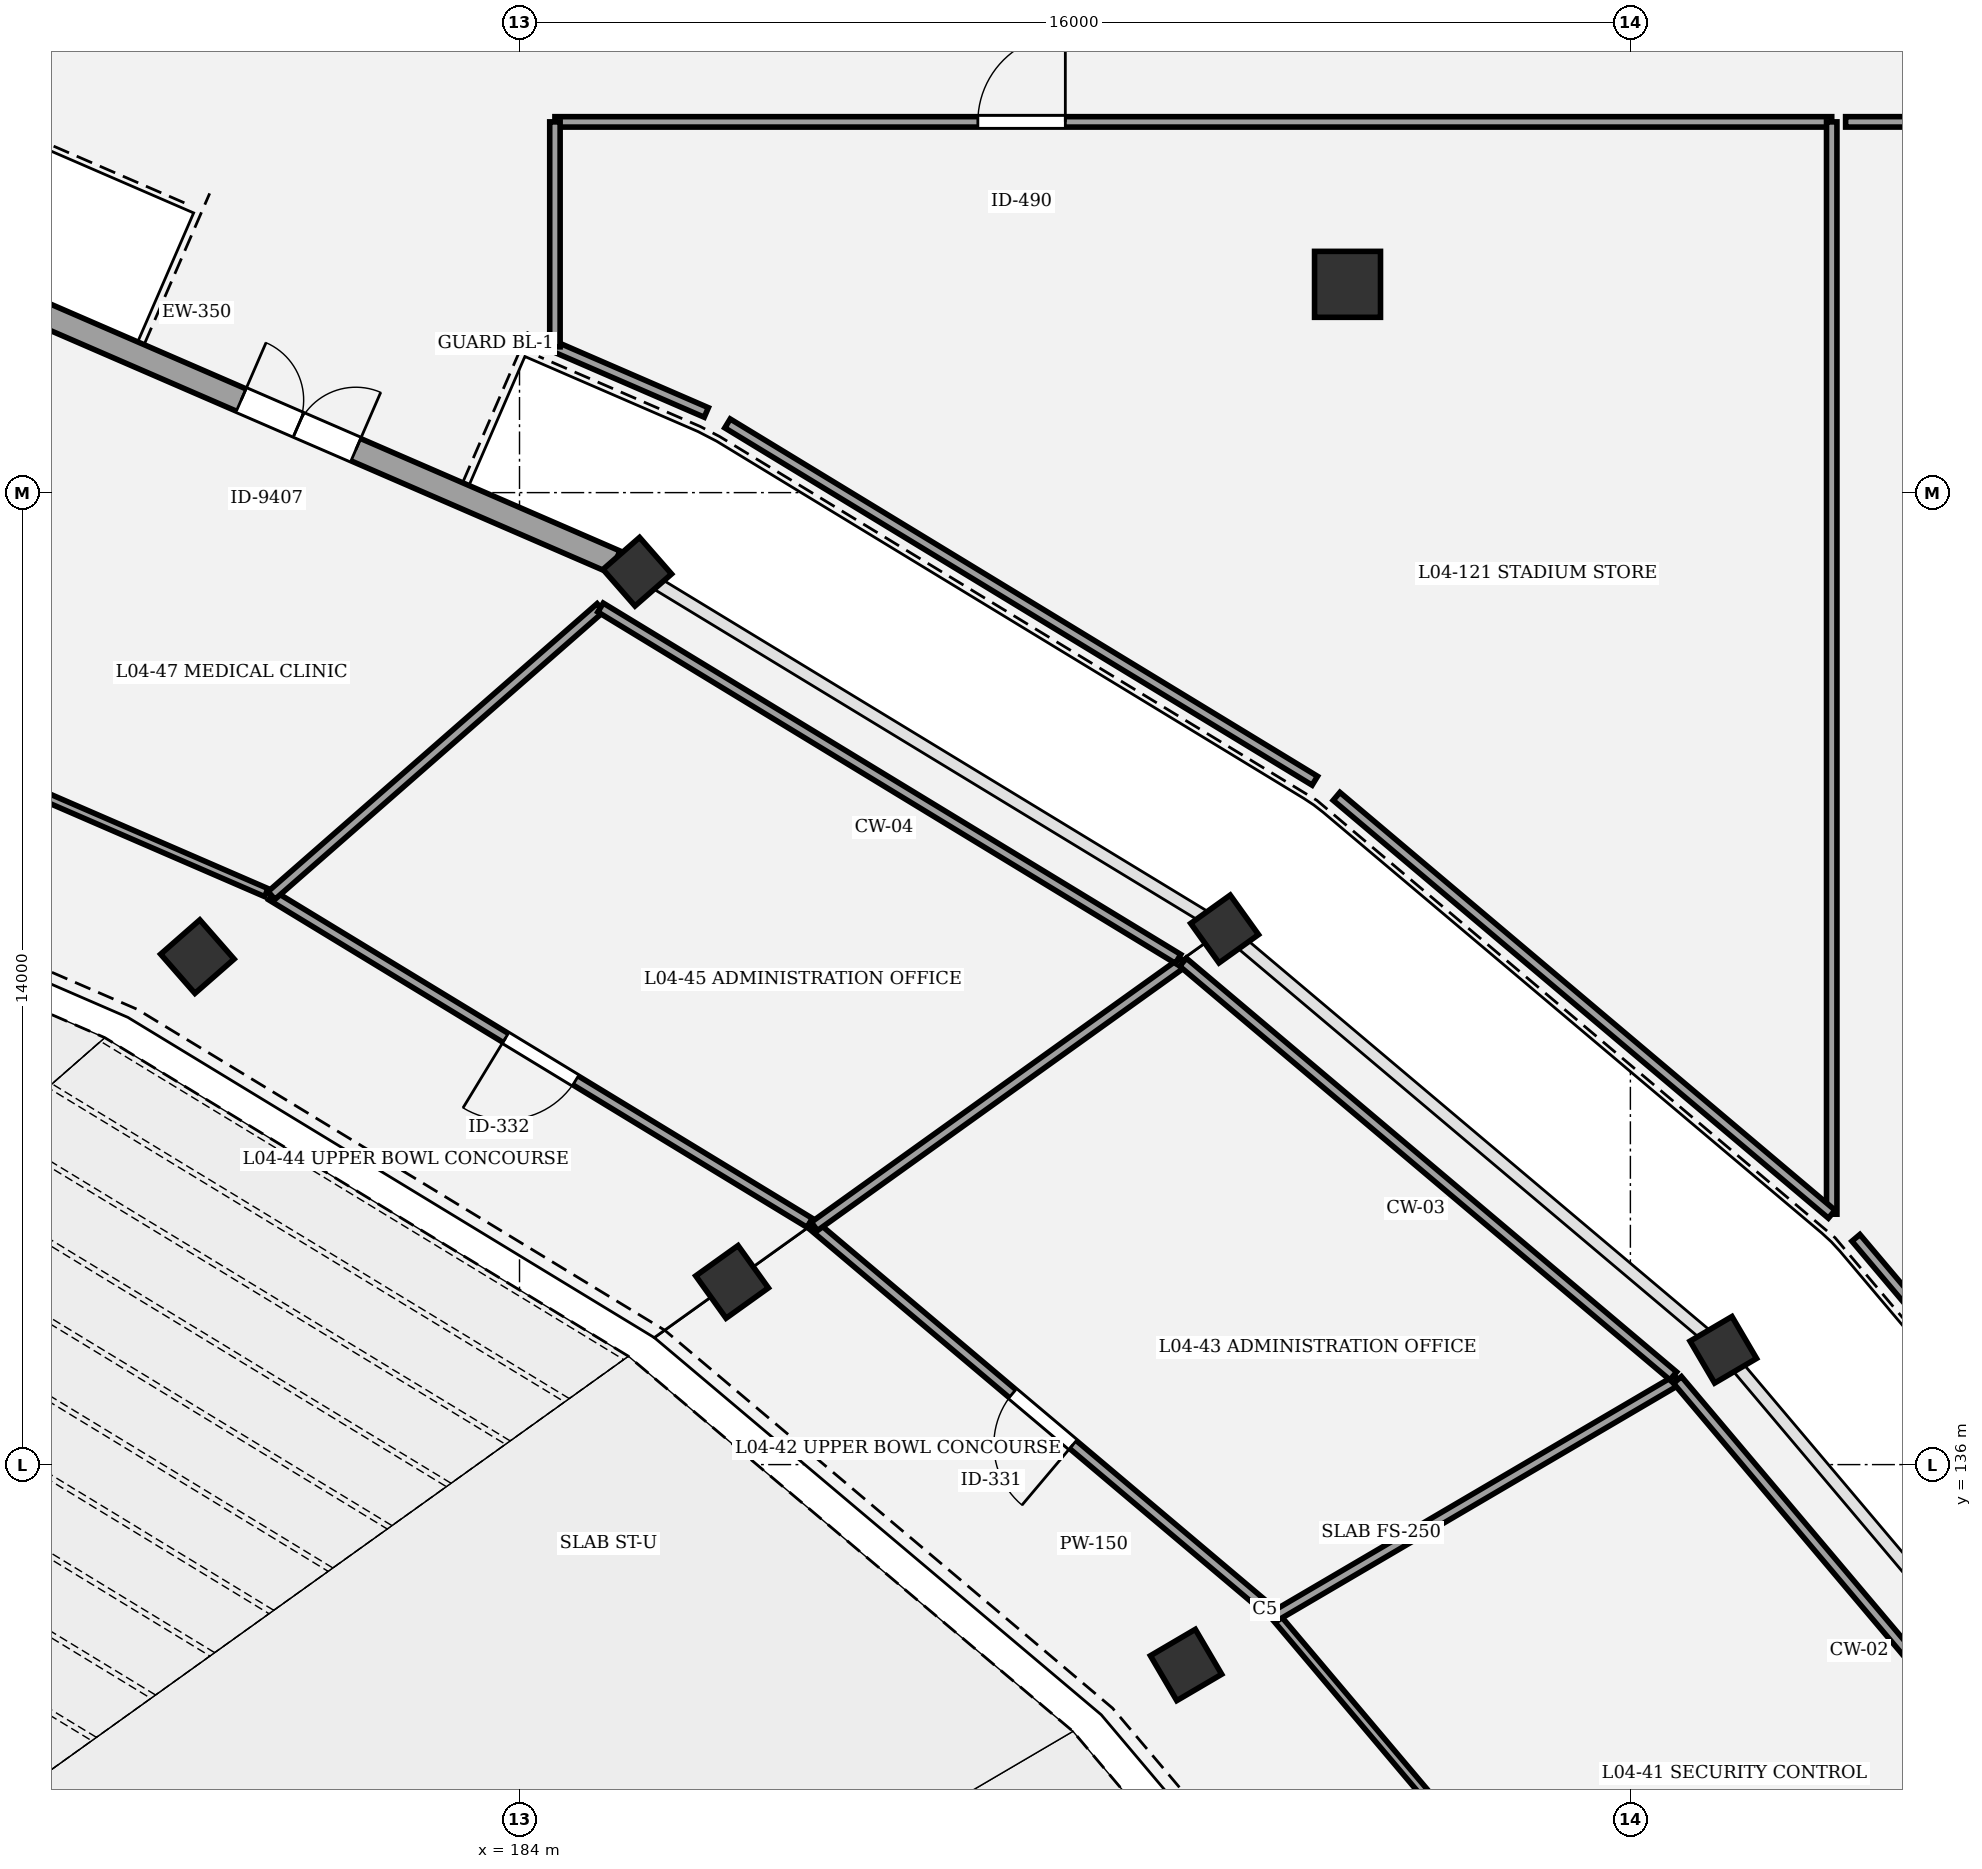
"""IFC4 building model, lengths in metres.
Left out: names, types, materials, properties, quantities, classifications, styles, units other than length and angle.
Written with IfcOpenShell. Run it as: python <this file> out.ifc"""

import sys

from ifc_helpers import new_model, si_unit, direction, frame, frame_2d, origin, origin_2d, place, context, subcontext, project, spatial, rectangle, circle, extrude, element, fill, save


model = new_model("IFC4")
c1 = context("Model", 3, precision=1e-05, world=origin(), true_north=direction((0.0, 1.0)))
c2 = subcontext(c1, "Body", "Model", "MODEL_VIEW")
j1 = project(units=[si_unit("LENGTHUNIT", "METRE"), si_unit("PLANEANGLEUNIT", "RADIAN")], contexts=[c1])
p1 = place(None, origin())
s1 = spatial("IfcSite", under=j1, at=p1, CompositionType="ELEMENT")
p2 = place(p1, origin())
s2 = spatial("IfcBuilding", under=s1, at=p2, CompositionType="ELEMENT")
p3 = place(p2, frame((0.0, 0.0, 19.2)))
s3 = spatial("IfcBuildingStorey", under=s2, at=p3, CompositionType="ELEMENT", Elevation=19.2)
p4 = place(p3, frame((193.6, 133.114, 0.0), z_axis=(0.0, 0.0, 1.0), x_axis=(0.862513669207, 0.506033764121, 0.0)))
e1 = element("IfcColumn", 1, at=p4, inside=s3, PredefinedType="COLUMN", context=c2, shape_type="SweptSolid", body=[
    extrude(rectangle(XDim=0.75, YDim=0.75, at=origin_2d()), origin(), (0.0, 0.0, 1.0), 4.8),
])
p5 = place(p3, frame((201.338, 137.654, 0.0), z_axis=(0.0, 0.0, 1.0), x_axis=(0.862513669207, 0.506033764121, 0.0)))
e2 = element("IfcColumn", 2, at=p5, inside=s3, PredefinedType="COLUMN", context=c2, shape_type="SweptSolid", body=[
    extrude(rectangle(XDim=0.7, YDim=0.7, at=origin_2d()), origin(), (0.0, 0.0, 1.0), 4.8),
])
p6 = place(p3, frame((187.061, 138.632, 0.0), z_axis=(0.0, 0.0, 1.0), x_axis=(0.812897512265, 0.582406760395, 0.0)))
e3 = element("IfcColumn", 3, at=p6, inside=s3, PredefinedType="COLUMN", context=c2, shape_type="SweptSolid", body=[
    extrude(rectangle(XDim=0.75, YDim=0.75, at=origin_2d()), origin(), (0.0, 0.0, 1.0), 4.8),
])
p7 = place(p3, frame((194.156, 143.715, 0.0), z_axis=(0.0, 0.0, 1.0), x_axis=(0.812897512265, 0.582406760395, 0.0)))
e4 = element("IfcColumn", 4, at=p7, inside=s3, PredefinedType="COLUMN", context=c2, shape_type="SweptSolid", body=[
    extrude(rectangle(XDim=0.7, YDim=0.7, at=origin_2d()), origin(), (0.0, 0.0, 1.0), 4.8),
])
p8 = place(p3, frame((179.36, 143.317, 0.0), z_axis=(0.0, 0.0, 1.0), x_axis=(0.752529860433, 0.658558128912, 0.0)))
e5 = element("IfcColumn", 5, at=p8, inside=s3, PredefinedType="COLUMN", context=c2, shape_type="SweptSolid", body=[
    extrude(rectangle(XDim=0.75, YDim=0.75, at=origin_2d()), origin(), (0.0, 0.0, 1.0), 4.8),
])
p9 = place(p3, frame((185.696, 148.861, 0.0), z_axis=(0.0, 0.0, 1.0), x_axis=(0.752529860433, 0.658558128912, 0.0)))
e6 = element("IfcColumn", 6, at=p9, inside=s3, PredefinedType="COLUMN", context=c2, shape_type="SweptSolid", body=[
    extrude(rectangle(XDim=0.7, YDim=0.7, at=origin_2d()), origin(), (0.0, 0.0, 1.0), 4.8),
])
p10 = place(p3, frame((195.926, 153.0, 0.0), z_axis=(0.0, 0.0, 1.0), x_axis=(1.0, 0.0, 0.0)))
e7 = element("IfcColumn", 7, at=p10, inside=s3, PredefinedType="COLUMN", context=c2, shape_type="SweptSolid", body=[
    extrude(circle(Radius=0.475, at=origin_2d()), origin(), (0.0, 0.0, 1.0), 4.8),
])
p11 = place(p3, frame((176.257, 152.953, 0.0), z_axis=(0.0, 0.0, 1.0), x_axis=(0.917498268626, -0.397739773052, 0.0)))
e8 = element("IfcWall", 8, at=p11, inside=s3, PredefinedType="STANDARD", context=c2, shape_type="SweptSolid", body=[
    extrude(rectangle(XDim=9.94, YDim=0.35, at=frame_2d((4.97, 0.0))), origin(), (0.0, 0.0, 1.0), 3.57),
])
p12 = place(p11, frame((4.07, 0.0, 0.0)))
e9 = element("IfcOpeningElement", 9, at=p12, cuts=e8, PredefinedType="OPENING", context=c2, shape_type="SweptSolid", body=[
    extrude(rectangle(XDim=1.8, YDim=2.4, at=frame_2d((0.9, 1.2))), frame((0.0, 0.185, 0.0), z_axis=(0.0, -1.0, 0.0), x_axis=(1.0, 0.0, 0.0)), (0.0, 0.0, 1.0), 0.37),
])
p13 = place(p3, frame((200.292, 127.416, 0.0), z_axis=(0.0, 0.0, 1.0), x_axis=(-0.645175528474, 0.764034382379, 0.0)))
e10 = element("IfcWall", 10, at=p13, inside=s3, PredefinedType="PARTITIONING", context=c2, shape_type="SweptSolid", body=[
    extrude(rectangle(XDim=8.383, YDim=0.125, at=frame_2d((4.191, 0.0))), origin(), (0.0, 0.0, 1.0), 3.55),
])
p14 = place(p13, frame((3.641, 0.0, 0.0)))
e11 = element("IfcOpeningElement", 11, at=p14, cuts=e10, PredefinedType="OPENING", context=c2, shape_type="SweptSolid", body=[
    extrude(rectangle(XDim=1.1, YDim=2.1, at=frame_2d((0.55, 1.05))), frame((0.0, 0.073, 0.0), z_axis=(0.0, -1.0, 0.0), x_axis=(1.0, 0.0, 0.0)), (0.0, 0.0, 1.0), 0.145),
])
p15 = place(p3, frame((194.826, 133.879, 0.0), z_axis=(0.0, 0.0, 1.0), x_axis=(-0.764262219363, 0.644905621044, 0.0)))
e12 = element("IfcWall", 12, at=p15, inside=s3, PredefinedType="PARTITIONING", context=c2, shape_type="SweptSolid", body=[
    extrude(rectangle(XDim=8.609, YDim=0.15, at=frame_2d((4.305, 0.0))), origin(), (0.0, 0.0, 1.0), 3.55),
])
p16 = place(p15, frame((3.735, 0.0, 0.0)))
e13 = element("IfcOpeningElement", 13, at=p16, cuts=e12, PredefinedType="OPENING", context=c2, shape_type="SweptSolid", body=[
    extrude(rectangle(XDim=1.14, YDim=2.1, at=frame_2d((0.57, 1.05))), frame((0.0, 0.085, 0.0), z_axis=(0.0, -1.0, 0.0), x_axis=(1.0, 0.0, 0.0)), (0.0, 0.0, 1.0), 0.17),
])
p17 = place(p3, frame((188.18, 139.482, 0.0), z_axis=(0.0, 0.0, 1.0), x_axis=(-0.85432634766, 0.519736944707, 0.0)))
e14 = element("IfcWall", 14, at=p17, inside=s3, PredefinedType="PARTITIONING", context=c2, shape_type="SweptSolid", body=[
    extrude(rectangle(XDim=9.073, YDim=0.15, at=frame_2d((4.537, 0.0))), origin(), (0.0, 0.0, 1.0), 3.55),
])
p18 = place(p17, frame((3.947, 0.0, 0.0)))
e15 = element("IfcOpeningElement", 15, at=p18, cuts=e14, PredefinedType="OPENING", context=c2, shape_type="SweptSolid", body=[
    extrude(rectangle(XDim=1.18, YDim=2.1, at=frame_2d((0.59, 1.05))), frame((0.0, 0.085, 0.0), z_axis=(0.0, -1.0, 0.0), x_axis=(1.0, 0.0, 0.0)), (0.0, 0.0, 1.0), 0.17),
])
p19 = place(p3, frame((180.354, 144.239, 0.0), z_axis=(0.0, 0.0, 1.0), x_axis=(-0.917512083526, 0.397707903596, 0.0)))
e16 = element("IfcWall", 16, at=p19, inside=s3, PredefinedType="PARTITIONING", context=c2, shape_type="SweptSolid", body=[
    extrude(rectangle(XDim=9.752, YDim=0.125, at=frame_2d((4.876, 0.0))), origin(), (0.0, 0.0, 1.0), 3.55),
])
p20 = place(p19, frame((4.266, 0.0, 0.0)))
e17 = element("IfcOpeningElement", 17, at=p20, cuts=e16, PredefinedType="OPENING", context=c2, shape_type="SweptSolid", body=[
    extrude(rectangle(XDim=1.22, YDim=2.1, at=frame_2d((0.61, 1.05))), frame((0.0, 0.073, 0.0), z_axis=(0.0, -1.0, 0.0), x_axis=(1.0, 0.0, 0.0)), (0.0, 0.0, 1.0), 0.145),
])
p21 = place(p3, frame((184.51, 155.34, 0.0), z_axis=(0.0, 0.0, 1.0), x_axis=(1.0, 0.0, 0.0)))
e18 = element("IfcWall", 18, at=p21, inside=s3, PredefinedType="PARTITIONING", context=c2, shape_type="SweptSolid", body=[
    extrude(rectangle(XDim=18.39, YDim=0.15, at=frame_2d((9.195, 0.0))), origin(), (0.0, 0.0, 1.0), 3.55),
])
p22 = place(p21, frame((6.092, 0.0, 0.0)))
e19 = element("IfcOpeningElement", 19, at=p22, cuts=e18, PredefinedType="OPENING", context=c2, shape_type="SweptSolid", body=[
    extrude(rectangle(XDim=1.26, YDim=2.2, at=frame_2d((0.63, 1.1))), frame((0.0, 0.085, 0.0), z_axis=(0.0, -1.0, 0.0), x_axis=(1.0, 0.0, 0.0)), (0.0, 0.0, 1.0), 0.17),
])
p23 = place(p3, frame((194.883, 133.82, 0.0), z_axis=(0.0, 0.0, 1.0), x_axis=(0.862533364667, 0.506000192527, 0.0)))
e20 = element("IfcWall", 20, at=p23, inside=s3, PredefinedType="PARTITIONING", context=c2, shape_type="SweptSolid", body=[
    extrude(rectangle(XDim=6.718, YDim=0.15, at=frame_2d((3.359, 0.0))), origin(), (0.0, 0.0, 1.0), 3.55),
])
p24 = place(p3, frame((200.678, 137.219, 0.0), z_axis=(0.0, 0.0, 1.0), x_axis=(0.645159696095, -0.764047751475, 0.0)))
e21 = element("IfcWall", 21, at=p24, inside=s3, PredefinedType="PARTITIONING", context=c2, shape_type="SweptSolid", body=[
    extrude(rectangle(XDim=8.997, YDim=0.15, at=frame_2d((4.498, 0.0))), origin(), (0.0, 0.0, 1.0), 3.55),
])
p25 = place(p3, frame((188.247, 139.432, 0.0), z_axis=(0.0, 0.0, 1.0), x_axis=(0.812889091692, 0.582418513277, 0.0)))
e22 = element("IfcWall", 22, at=p25, inside=s3, PredefinedType="PARTITIONING", context=c2, shape_type="SweptSolid", body=[
    extrude(rectangle(XDim=6.532, YDim=0.15, at=frame_2d((3.266, 0.0))), origin(), (0.0, 0.0, 1.0), 3.55),
])
p26 = place(p3, frame((193.556, 143.236, 0.0), z_axis=(0.0, 0.0, 1.0), x_axis=(0.764260552728, -0.644907596129, 0.0)))
e23 = element("IfcWall", 23, at=p26, inside=s3, PredefinedType="PARTITIONING", context=c2, shape_type="SweptSolid", body=[
    extrude(rectangle(XDim=9.24, YDim=0.15, at=frame_2d((4.62, 0.0))), origin(), (0.0, 0.0, 1.0), 3.55),
])
p27 = place(p3, frame((180.428, 144.198, 0.0), z_axis=(0.0, 0.0, 1.0), x_axis=(0.75256948957, 0.65851284222, 0.0)))
e24 = element("IfcWall", 24, at=p27, inside=s3, PredefinedType="PARTITIONING", context=c2, shape_type="SweptSolid", body=[
    extrude(rectangle(XDim=6.297, YDim=0.15, at=frame_2d((3.148, 0.0))), origin(), (0.0, 0.0, 1.0), 3.55),
])
p28 = place(p3, frame((185.167, 148.345, 0.0), z_axis=(0.0, 0.0, 1.0), x_axis=(0.854310862528, -0.519762397799, 0.0)))
e25 = element("IfcWall", 25, at=p28, inside=s3, PredefinedType="PARTITIONING", context=c2, shape_type="SweptSolid", body=[
    extrude(rectangle(XDim=9.737, YDim=0.15, at=frame_2d((4.869, 0.0))), origin(), (0.0, 0.0, 1.0), 3.55),
])
p29 = place(p3, frame((195.455, 145.85, 0.0), z_axis=(0.0, 0.0, 1.0), x_axis=(-0.854333268174, 0.519725568826, 0.0)))
e26 = element("IfcWall", 26, at=p29, inside=s3, PredefinedType="PARTITIONING", context=c2, shape_type="SweptSolid", body=[
    extrude(rectangle(XDim=9.902, YDim=0.15, at=frame_2d((4.951, 0.0))), origin(), (0.0, 0.0, 1.0), 3.55),
])
p30 = place(p3, frame((186.69, 151.155, 0.0), z_axis=(0.0, 0.0, 1.0), x_axis=(-0.917484400903, 0.397771761314, 0.0)))
e27 = element("IfcWall", 27, at=p30, inside=s3, PredefinedType="PARTITIONING", context=c2, shape_type="SweptSolid", body=[
    extrude(rectangle(XDim=2.376, YDim=0.15, at=frame_2d((1.188, 0.0))), origin(), (0.0, 0.0, 1.0), 3.55),
])
p31 = place(p3, frame((184.51, 152.1, 0.0), z_axis=(0.0, 0.0, 1.0), x_axis=(0.0, 1.0, 0.0)))
e28 = element("IfcWall", 28, at=p31, inside=s3, PredefinedType="PARTITIONING", context=c2, shape_type="SweptSolid", body=[
    extrude(rectangle(XDim=3.24, YDim=0.15, at=frame_2d((1.62, 0.0))), origin(), (0.0, 0.0, 1.0), 3.55),
])
p32 = place(p3, frame((202.9, 155.34, 0.0), z_axis=(0.0, 0.0, 1.0), x_axis=(0.0, -1.0, 0.0)))
e29 = element("IfcWall", 29, at=p32, inside=s3, PredefinedType="PARTITIONING", context=c2, shape_type="SweptSolid", body=[
    extrude(rectangle(XDim=15.733, YDim=0.15, at=frame_2d((7.867, 0.0))), origin(), (0.0, 0.0, 1.0), 3.55),
])
p33 = place(p3, frame((202.9, 139.607, 0.0), z_axis=(0.0, 0.0, 1.0), x_axis=(-0.764245949545, 0.644924901523, 0.0)))
e30 = element("IfcWall", 30, at=p33, inside=s3, PredefinedType="PARTITIONING", context=c2, shape_type="SweptSolid", body=[
    extrude(rectangle(XDim=9.332, YDim=0.15, at=frame_2d((4.666, 0.0))), origin(), (0.0, 0.0, 1.0), 3.55),
])
p34 = place(p3, frame((209.153, 132.274, 0.0), z_axis=(0.0, 0.0, 1.0), x_axis=(-0.645180125691, 0.764030500316, 0.0)))
e31 = element("IfcWall", 31, at=p34, inside=s3, PredefinedType="PARTITIONING", context=c2, shape_type="SweptSolid", body=[
    extrude(rectangle(XDim=9.151, YDim=0.15, at=frame_2d((4.576, 0.0))), origin(), (0.0, 0.0, 1.0), 3.55),
])
p35 = place(p3, frame((203.1, 155.34, 0.0), z_axis=(0.0, 0.0, 1.0), x_axis=(0.99999997621, 0.00021812629, 0.0)))
e32 = element("IfcWall", 32, at=p35, inside=s3, PredefinedType="PARTITIONING", context=c2, shape_type="SweptSolid", body=[
    extrude(rectangle(XDim=13.431, YDim=0.15, at=frame_2d((6.716, 0.0))), origin(), (0.0, 0.0, 1.0), 3.55),
])
p36 = place(p12, origin())
e33 = element("IfcDoor", 33, at=p36, inside=s3, OperationType="DOUBLE_DOOR_SINGLE_SWING", PredefinedType="DOOR", context=c2, shape_type="SweptSolid", body=[
    extrude(rectangle(XDim=1.8, YDim=2.4, at=frame_2d((0.9, 1.2))), frame((0.0, 0.025, 0.0), z_axis=(0.0, -1.0, 0.0), x_axis=(1.0, 0.0, 0.0)), (0.0, 0.0, 1.0), 0.05),
])
fill(e9, e33)
p37 = place(p16, origin())
e34 = element("IfcDoor", 34, at=p37, inside=s3, OperationType="SINGLE_SWING_LEFT", PredefinedType="DOOR", context=c2, shape_type="SweptSolid", body=[
    extrude(rectangle(XDim=1.14, YDim=2.1, at=frame_2d((0.57, 1.05))), frame((0.0, 0.025, 0.0), z_axis=(0.0, -1.0, 0.0), x_axis=(1.0, 0.0, 0.0)), (0.0, 0.0, 1.0), 0.05),
])
fill(e13, e34)
p38 = place(p18, origin())
e35 = element("IfcDoor", 35, at=p38, inside=s3, OperationType="SINGLE_SWING_RIGHT", PredefinedType="DOOR", context=c2, shape_type="SweptSolid", body=[
    extrude(rectangle(XDim=1.18, YDim=2.1, at=frame_2d((0.59, 1.05))), frame((0.0, 0.025, 0.0), z_axis=(0.0, -1.0, 0.0), x_axis=(1.0, 0.0, 0.0)), (0.0, 0.0, 1.0), 0.05),
])
fill(e15, e35)
p39 = place(p22, origin())
e36 = element("IfcDoor", 36, at=p39, inside=s3, OperationType="SINGLE_SWING_RIGHT", PredefinedType="DOOR", context=c2, shape_type="SweptSolid", body=[
    extrude(rectangle(XDim=1.26, YDim=2.2, at=frame_2d((0.63, 1.1))), frame((0.0, 0.025, 0.0), z_axis=(0.0, -1.0, 0.0), x_axis=(1.0, 0.0, 0.0)), (0.0, 0.0, 1.0), 0.05),
])
fill(e19, e36)
save(model, sys.argv[1])
